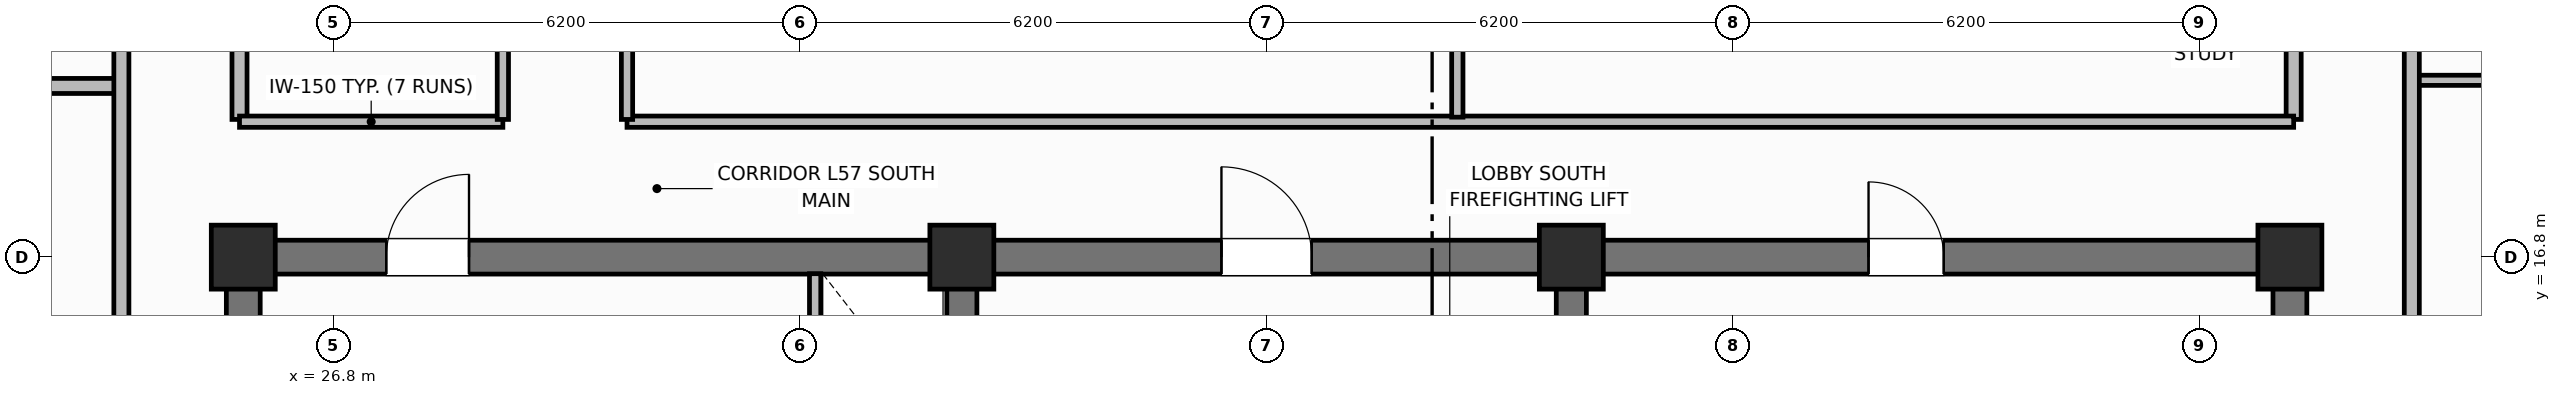
"""IFC4 building model, lengths in metres.
Left out: names, types, materials, properties, quantities, classifications, styles, units other than length and angle.
Written with IfcOpenShell. Run it as: python <this file> out.ifc"""

import sys

from ifc_helpers import new_model, si_unit, direction, frame, frame_2d, origin, origin_2d, place, context, subcontext, project, spatial, rectangle, extrude, element, fill, save


model = new_model("IFC4")
c1 = context("Model", 3, precision=1e-05, world=origin(), true_north=direction((0.0, 1.0)))
c2 = subcontext(c1, "Body", "Model", "MODEL_VIEW")
j1 = project(units=[si_unit("LENGTHUNIT", "METRE"), si_unit("PLANEANGLEUNIT", "RADIAN")], contexts=[c1])
p1 = place(None, origin())
s1 = spatial("IfcSite", under=j1, at=p1, CompositionType="ELEMENT")
p2 = place(p1, origin())
s2 = spatial("IfcBuilding", under=s1, at=p2, CompositionType="ELEMENT")
p3 = place(p2, frame((0.0, 0.0, 229.5)))
s3 = spatial("IfcBuildingStorey", under=s2, at=p3, CompositionType="ELEMENT", Elevation=229.5)
for number, where, z_axis, x_axis in (
    (1, (25.6, 10.825, 0.0), (0.0, 0.0, 1.0), (0.0, 1.0, 0.0)),
    (2, (52.8, 10.825, 0.0), (0.0, 0.0, 1.0), (0.0, 1.0, 0.0)),
):
    element("IfcWall", number, at=place(p3, frame(where, z_axis=z_axis, x_axis=x_axis)), inside=s3, PredefinedType="SHEAR", context=c2, shape_type="SweptSolid", body=[
        extrude(rectangle(XDim=5.75, YDim=0.45, at=frame_2d((2.875, 0.0))), origin(), (0.0, 0.0, 1.0), 3.7),
    ])
p4 = place(p3, frame((25.6, 16.8, 0.0), z_axis=(0.0, 0.0, 1.0), x_axis=(1.0, 0.0, 0.0)))
e3 = element("IfcWall", 3, at=p4, inside=s3, PredefinedType="SHEAR", context=c2, shape_type="SweptSolid", body=[
    extrude(rectangle(XDim=27.2, YDim=0.45, at=frame_2d((13.6, 0.0))), origin(), (0.0, 0.0, 1.0), 3.7),
])
p5 = place(p4, frame((1.9, 0.0, 0.0)))
e4 = element("IfcOpeningElement", 4, at=p5, cuts=e3, PredefinedType="OPENING", context=c2, shape_type="SweptSolid", body=[
    extrude(rectangle(XDim=1.1, YDim=2.15, at=frame_2d((0.55, 1.075))), frame((0.0, 0.235, 0.0), z_axis=(0.0, -1.0, 0.0), x_axis=(1.0, 0.0, 0.0)), (0.0, 0.0, 1.0), 0.47),
])
p6 = place(p4, frame((13.0, 0.0, 0.0)))
e5 = element("IfcOpeningElement", 5, at=p6, cuts=e3, PredefinedType="OPENING", context=c2, shape_type="SweptSolid", body=[
    extrude(rectangle(XDim=1.2, YDim=2.15, at=frame_2d((0.6, 1.075))), frame((0.0, 0.235, 0.0), z_axis=(0.0, -1.0, 0.0), x_axis=(1.0, 0.0, 0.0)), (0.0, 0.0, 1.0), 0.47),
])
p7 = place(p4, frame((21.6, 0.0, 0.0)))
e6 = element("IfcOpeningElement", 6, at=p7, cuts=e3, PredefinedType="OPENING", context=c2, shape_type="SweptSolid", body=[
    extrude(rectangle(XDim=1.0, YDim=2.15, at=frame_2d((0.5, 1.075))), frame((0.0, 0.235, 0.0), z_axis=(0.0, -1.0, 0.0), x_axis=(1.0, 0.0, 0.0)), (0.0, 0.0, 1.0), 0.47),
])
for number, where, z_axis, x_axis in (
    (7, (35.15, 10.825, 0.0), (0.0, 0.0, 1.0), (0.0, 1.0, 0.0)),
    (8, (43.25, 10.825, 0.0), (0.0, 0.0, 1.0), (0.0, 1.0, 0.0)),
):
    element("IfcWall", number, at=place(p3, frame(where, z_axis=z_axis, x_axis=x_axis)), inside=s3, PredefinedType="SHEAR", context=c2, shape_type="SweptSolid", body=[
        extrude(rectangle(XDim=5.75, YDim=0.4, at=frame_2d((2.875, 0.0))), origin(), (0.0, 0.0, 1.0), 3.7),
    ])
for number, where, z_axis, x_axis in (
    (9, (25.6, 16.8, 0.0), (0.0, 0.0, 1.0), (1.0, 0.0, 0.0)),
    (10, (35.15, 16.8, 0.0), (0.0, 0.0, 1.0), (1.0, 0.0, 0.0)),
    (11, (43.25, 16.8, 0.0), (0.0, 0.0, 1.0), (1.0, 0.0, 0.0)),
    (12, (52.8, 16.8, 0.0), (0.0, 0.0, 1.0), (1.0, 0.0, 0.0)),
):
    element("IfcColumn", number, at=place(p3, frame(where, z_axis=z_axis, x_axis=x_axis)), inside=s3, PredefinedType="COLUMN", context=c2, shape_type="SweptSolid", body=[
        extrude(rectangle(XDim=0.85, YDim=0.85, at=origin_2d()), origin(), (0.0, 0.0, 1.0), 3.7),
    ])
p8 = place(p3, frame((33.2, 14.5, 0.0), z_axis=(0.0, 0.0, 1.0), x_axis=(0.0, 1.0, 0.0)))
e13 = element("IfcWall", 13, at=p8, inside=s3, PredefinedType="PARTITIONING", context=c2, shape_type="SweptSolid", body=[
    extrude(rectangle(XDim=2.08, YDim=0.15, at=frame_2d((1.04, 0.0))), origin(), (0.0, 0.0, 1.0), 2.56),
])
p9 = place(p8, frame((0.55, 0.0, 0.0)))
e14 = element("IfcOpeningElement", 14, at=p9, cuts=e13, PredefinedType="OPENING", context=c2, shape_type="SweptSolid", body=[
    extrude(rectangle(XDim=0.85, YDim=2.05, at=frame_2d((0.425, 1.025))), frame((0.0, 0.085, 0.0), z_axis=(0.0, -1.0, 0.0), x_axis=(1.0, 0.0, 0.0)), (0.0, 0.0, 1.0), 0.17),
])
for number, where, z_axis, x_axis in (
    (15, (25.55, 18.63, 0.0), (0.0, 0.0, 1.0), (0.0, 1.0, 0.0)),
    (16, (52.85, 18.63, 0.0), (0.0, 0.0, 1.0), (0.0, 1.0, 0.0)),
):
    element("IfcWall", number, at=place(p3, frame(where, z_axis=z_axis, x_axis=x_axis)), inside=s3, PredefinedType="PARTITIONING", context=c2, shape_type="SweptSolid", body=[
        extrude(rectangle(XDim=19.14, YDim=0.2, at=frame_2d((9.57, 0.0))), origin(), (0.0, 0.0, 1.0), 2.56),
    ])
p10 = place(p3, frame((25.55, 18.6, 0.0), z_axis=(0.0, 0.0, 1.0), x_axis=(1.0, 0.0, 0.0)))
e17 = element("IfcWall", 17, at=p10, inside=s3, PredefinedType="PARTITIONING", context=c2, shape_type="SweptSolid", body=[
    extrude(rectangle(XDim=3.5, YDim=0.15, at=frame_2d((1.75, 0.0))), origin(), (0.0, 0.0, 1.0), 2.56),
])
p11 = place(p3, frame((30.7, 18.6, 0.0), z_axis=(0.0, 0.0, 1.0), x_axis=(1.0, 0.0, 0.0)))
e18 = element("IfcWall", 18, at=p11, inside=s3, PredefinedType="PARTITIONING", context=c2, shape_type="SweptSolid", body=[
    extrude(rectangle(XDim=22.15, YDim=0.15, at=frame_2d((11.075, 0.0))), origin(), (0.0, 0.0, 1.0), 2.56),
])
p12 = place(p3, frame((41.735, 18.66, 0.0), z_axis=(0.0, 0.0, 1.0), x_axis=(0.0, 1.0, 0.0)))
e19 = element("IfcWall", 19, at=p12, inside=s3, PredefinedType="PARTITIONING", context=c2, shape_type="SweptSolid", body=[
    extrude(rectangle(XDim=19.08, YDim=0.15, at=frame_2d((9.54, 0.0))), origin(), (0.0, 0.0, 1.0), 2.56),
])
p13 = place(p12, frame((6.5, 0.0, 0.0)))
e20 = element("IfcOpeningElement", 20, at=p13, cuts=e19, PredefinedType="OPENING", context=c2, shape_type="SweptSolid", body=[
    extrude(rectangle(XDim=1.0, YDim=2.15, at=frame_2d((0.5, 1.075))), frame((0.0, 0.085, 0.0), z_axis=(0.0, -1.0, 0.0), x_axis=(1.0, 0.0, 0.0)), (0.0, 0.0, 1.0), 0.17),
])
p14 = place(p3, frame((29.05, 18.63, 0.0), z_axis=(0.0, 0.0, 1.0), x_axis=(0.0, 1.0, 0.0)))
e21 = element("IfcWall", 21, at=p14, inside=s3, PredefinedType="PARTITIONING", context=c2, shape_type="SweptSolid", body=[
    extrude(rectangle(XDim=19.14, YDim=0.15, at=frame_2d((9.57, 0.0))), origin(), (0.0, 0.0, 1.0), 2.56),
])
p15 = place(p14, frame((5.5, 0.0, 0.0)))
e22 = element("IfcOpeningElement", 22, at=p15, cuts=e21, PredefinedType="OPENING", context=c2, shape_type="SweptSolid", body=[
    extrude(rectangle(XDim=1.0, YDim=2.15, at=frame_2d((0.5, 1.075))), frame((0.0, 0.085, 0.0), z_axis=(0.0, -1.0, 0.0), x_axis=(1.0, 0.0, 0.0)), (0.0, 0.0, 1.0), 0.17),
])
p16 = place(p3, frame((30.7, 18.63, 0.0), z_axis=(0.0, 0.0, 1.0), x_axis=(0.0, 1.0, 0.0)))
e23 = element("IfcWall", 23, at=p16, inside=s3, PredefinedType="PARTITIONING", context=c2, shape_type="SweptSolid", body=[
    extrude(rectangle(XDim=19.14, YDim=0.15, at=frame_2d((9.57, 0.0))), origin(), (0.0, 0.0, 1.0), 2.56),
])
p17 = place(p16, frame((5.5, 0.0, 0.0)))
e24 = element("IfcOpeningElement", 24, at=p17, cuts=e23, PredefinedType="OPENING", context=c2, shape_type="SweptSolid", body=[
    extrude(rectangle(XDim=1.0, YDim=2.15, at=frame_2d((0.5, 1.075))), frame((0.0, 0.085, 0.0), z_axis=(0.0, -1.0, 0.0), x_axis=(1.0, 0.0, 0.0)), (0.0, 0.0, 1.0), 0.17),
])
p18 = place(p3, frame((19.53, 19.075, 0.0), z_axis=(0.0, 0.0, 1.0), x_axis=(1.0, 0.0, 0.0)))
e25 = element("IfcWall", 25, at=p18, inside=s3, PredefinedType="PARTITIONING", context=c2, shape_type="SweptSolid", body=[
    extrude(rectangle(XDim=4.45, YDim=0.2, at=frame_2d((2.225, 0.0))), origin(), (0.0, 0.0, 1.0), 2.56),
])
p19 = place(p3, frame((23.98, 9.95, 0.0), z_axis=(0.0, 0.0, 1.0), x_axis=(0.0, 1.0, 0.0)))
e26 = element("IfcWall", 26, at=p19, inside=s3, PredefinedType="PARTITIONING", context=c2, shape_type="SweptSolid", body=[
    extrude(rectangle(XDim=36.5, YDim=0.2, at=frame_2d((18.25, 0.0))), origin(), (0.0, 0.0, 1.0), 2.56),
])
p20 = place(p19, frame((2.93, 0.0, 0.0)))
e27 = element("IfcOpeningElement", 27, at=p20, cuts=e26, PredefinedType="OPENING", context=c2, shape_type="SweptSolid", body=[
    extrude(rectangle(XDim=1.0, YDim=2.15, at=frame_2d((0.5, 1.075))), frame((0.0, 0.11, 0.0), z_axis=(0.0, -1.0, 0.0), x_axis=(1.0, 0.0, 0.0)), (0.0, 0.0, 1.0), 0.22),
])
p21 = place(p19, frame((10.525, 0.0, 0.0)))
e28 = element("IfcOpeningElement", 28, at=p21, cuts=e26, PredefinedType="OPENING", context=c2, shape_type="SweptSolid", body=[
    extrude(rectangle(XDim=1.0, YDim=2.15, at=frame_2d((0.5, 1.075))), frame((0.0, 0.11, 0.0), z_axis=(0.0, -1.0, 0.0), x_axis=(1.0, 0.0, 0.0)), (0.0, 0.0, 1.0), 0.22),
])
p22 = place(p19, frame((15.175, 0.0, 0.0)))
e29 = element("IfcOpeningElement", 29, at=p22, cuts=e26, PredefinedType="OPENING", context=c2, shape_type="SweptSolid", body=[
    extrude(rectangle(XDim=1.0, YDim=2.15, at=frame_2d((0.5, 1.075))), frame((0.0, 0.11, 0.0), z_axis=(0.0, -1.0, 0.0), x_axis=(1.0, 0.0, 0.0)), (0.0, 0.0, 1.0), 0.22),
])
p23 = place(p19, frame((27.925, 0.0, 0.0)))
e30 = element("IfcOpeningElement", 30, at=p23, cuts=e26, PredefinedType="OPENING", context=c2, shape_type="SweptSolid", body=[
    extrude(rectangle(XDim=1.0, YDim=2.15, at=frame_2d((0.5, 1.075))), frame((0.0, 0.11, 0.0), z_axis=(0.0, -1.0, 0.0), x_axis=(1.0, 0.0, 0.0)), (0.0, 0.0, 1.0), 0.22),
])
p24 = place(p3, frame((54.42, 19.15, 0.0), z_axis=(0.0, 0.0, 1.0), x_axis=(1.0, 0.0, 0.0)))
e31 = element("IfcWall", 31, at=p24, inside=s3, PredefinedType="PARTITIONING", context=c2, shape_type="SweptSolid", body=[
    extrude(rectangle(XDim=1.95, YDim=0.135, at=frame_2d((0.975, 0.0))), origin(), (0.0, 0.0, 1.0), 2.56),
])
p25 = place(p3, frame((54.42, 9.95, 0.0), z_axis=(0.0, 0.0, 1.0), x_axis=(0.0, 1.0, 0.0)))
e32 = element("IfcWall", 32, at=p25, inside=s3, PredefinedType="PARTITIONING", context=c2, shape_type="SweptSolid", body=[
    extrude(rectangle(XDim=36.5, YDim=0.2, at=frame_2d((18.25, 0.0))), origin(), (0.0, 0.0, 1.0), 2.56),
])
p26 = place(p25, frame((3.25, 0.0, 0.0)))
e33 = element("IfcOpeningElement", 33, at=p26, cuts=e32, PredefinedType="OPENING", context=c2, shape_type="SweptSolid", body=[
    extrude(rectangle(XDim=1.0, YDim=2.15, at=frame_2d((0.5, 1.075))), frame((0.0, 0.11, 0.0), z_axis=(0.0, -1.0, 0.0), x_axis=(1.0, 0.0, 0.0)), (0.0, 0.0, 1.0), 0.22),
])
p27 = place(p25, frame((12.96, 0.0, 0.0)))
e34 = element("IfcOpeningElement", 34, at=p27, cuts=e32, PredefinedType="OPENING", context=c2, shape_type="SweptSolid", body=[
    extrude(rectangle(XDim=1.0, YDim=2.15, at=frame_2d((0.5, 1.075))), frame((0.0, 0.11, 0.0), z_axis=(0.0, -1.0, 0.0), x_axis=(1.0, 0.0, 0.0)), (0.0, 0.0, 1.0), 0.22),
])
p28 = place(p25, frame((24.3, 0.0, 0.0)))
e35 = element("IfcOpeningElement", 35, at=p28, cuts=e32, PredefinedType="OPENING", context=c2, shape_type="SweptSolid", body=[
    extrude(rectangle(XDim=1.0, YDim=2.15, at=frame_2d((0.5, 1.075))), frame((0.0, 0.11, 0.0), z_axis=(0.0, -1.0, 0.0), x_axis=(1.0, 0.0, 0.0)), (0.0, 0.0, 1.0), 0.22),
])
p29 = place(p5, origin())
e36 = element("IfcDoor", 36, at=p29, inside=s3, OperationType="SINGLE_SWING_RIGHT", PredefinedType="DOOR", context=c2, shape_type="SweptSolid", body=[
    extrude(rectangle(XDim=1.1, YDim=2.15, at=frame_2d((0.55, 1.075))), frame((0.0, 0.025, 0.0), z_axis=(0.0, -1.0, 0.0), x_axis=(1.0, 0.0, 0.0)), (0.0, 0.0, 1.0), 0.05),
])
fill(e4, e36)
p30 = place(p6, origin())
e37 = element("IfcDoor", 37, at=p30, inside=s3, OperationType="SINGLE_SWING_LEFT", PredefinedType="DOOR", context=c2, shape_type="SweptSolid", body=[
    extrude(rectangle(XDim=1.2, YDim=2.15, at=frame_2d((0.6, 1.075))), frame((0.0, 0.025, 0.0), z_axis=(0.0, -1.0, 0.0), x_axis=(1.0, 0.0, 0.0)), (0.0, 0.0, 1.0), 0.05),
])
fill(e5, e37)
p31 = place(p7, origin())
e38 = element("IfcDoor", 38, at=p31, inside=s3, OperationType="SINGLE_SWING_LEFT", PredefinedType="DOOR", context=c2, shape_type="SweptSolid", body=[
    extrude(rectangle(XDim=1.0, YDim=2.15, at=frame_2d((0.5, 1.075))), frame((0.0, 0.025, 0.0), z_axis=(0.0, -1.0, 0.0), x_axis=(1.0, 0.0, 0.0)), (0.0, 0.0, 1.0), 0.05),
])
fill(e6, e38)
save(model, sys.argv[1])
